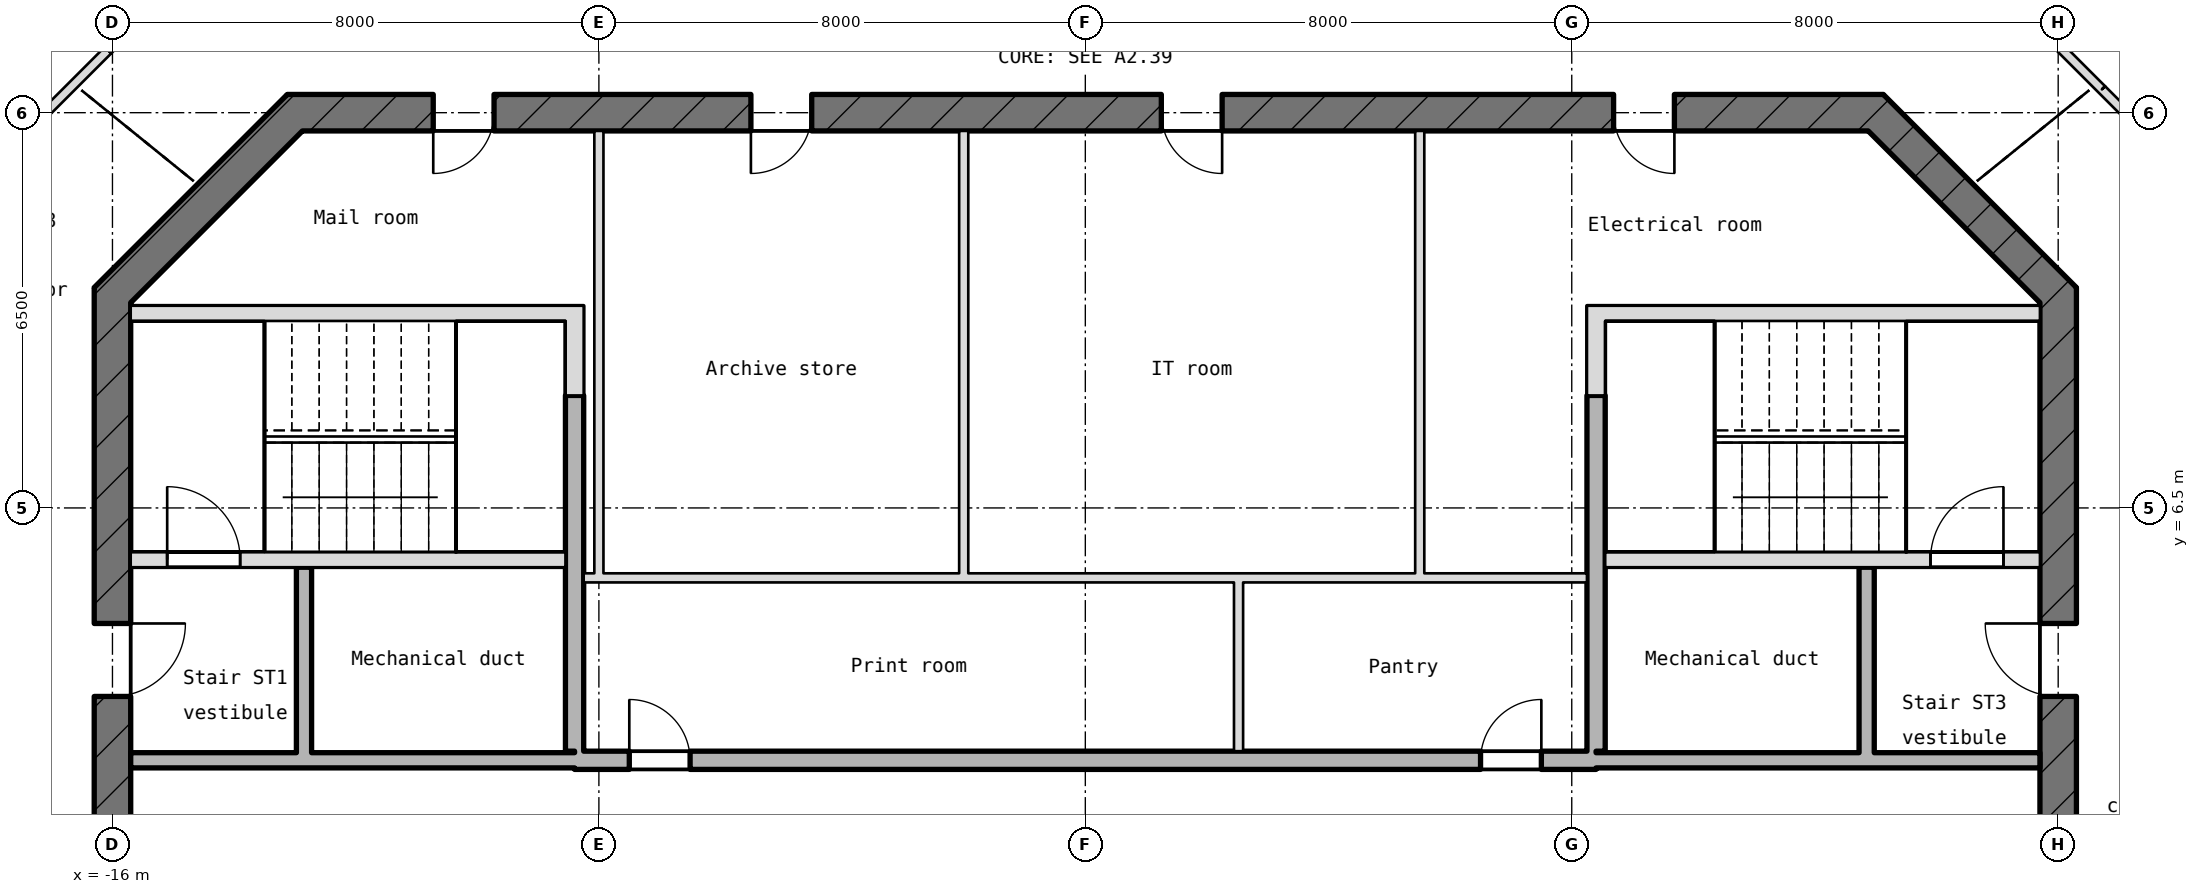
"""IFC4 building model, lengths in metres.
Left out: names, types, materials, properties, quantities, classifications, styles, units other than length and angle.
Written with IfcOpenShell. Run it as: python <this file> out.ifc"""

import sys

from ifc_helpers import new_model, si_unit, direction, frame, frame_2d, origin, place, context, subcontext, project, spatial, rectangle, extrude, element, fill, save


model = new_model("IFC4")
c1 = context("Model", 3, precision=1e-05, world=origin(), true_north=direction((0.0, 1.0)))
c2 = subcontext(c1, "Body", "Model", "MODEL_VIEW")
j1 = project(units=[si_unit("LENGTHUNIT", "METRE"), si_unit("PLANEANGLEUNIT", "RADIAN")], contexts=[c1])
p1 = place(None, origin())
s1 = spatial("IfcSite", under=j1, at=p1, CompositionType="ELEMENT")
p2 = place(p1, origin())
s2 = spatial("IfcBuilding", under=s1, at=p2, CompositionType="ELEMENT")
p3 = place(p2, frame((0.0, 0.0, 413.55)))
s3 = spatial("IfcBuildingStorey", under=s2, at=p3, CompositionType="ELEMENT", Elevation=413.55)
p4 = place(p3, frame((16.0, -10.124, -0.2), z_axis=(0.0, 0.0, 1.0), x_axis=(0.0, 1.0, 0.0)))
e1 = element("IfcWall", 1, at=p4, inside=s3, PredefinedType="SHEAR", context=c2, shape_type="SweptSolid", body=[
    extrude(rectangle(XDim=20.249, YDim=0.6, at=frame_2d((10.124, 0.0))), origin(), (0.0, 0.0, 1.0), 5.0),
])
p5 = place(p4, frame((8.924, 0.0, 0.2)))
e2 = element("IfcOpeningElement", 2, at=p5, cuts=e1, PredefinedType="OPENING", context=c2, shape_type="SweptSolid", body=[
    extrude(rectangle(XDim=2.4, YDim=2.1, at=frame_2d((1.2, 1.05))), frame((0.0, 0.31, 0.0), z_axis=(0.0, -1.0, 0.0), x_axis=(1.0, 0.0, 0.0)), (0.0, 0.0, 1.0), 0.62),
])
p6 = place(p4, frame((13.524, 0.0, 0.2)))
e3 = element("IfcOpeningElement", 3, at=p6, cuts=e1, PredefinedType="OPENING", context=c2, shape_type="SweptSolid", body=[
    extrude(rectangle(XDim=1.2, YDim=2.1, at=frame_2d((0.6, 1.05))), frame((0.0, 0.31, 0.0), z_axis=(0.0, -1.0, 0.0), x_axis=(1.0, 0.0, 0.0)), (0.0, 0.0, 1.0), 0.62),
])
p7 = place(p3, frame((16.088, 9.912, -0.2), z_axis=(0.0, 0.0, 1.0), x_axis=(-0.707106781187, 0.707106781187, 0.0)))
e4 = element("IfcWall", 4, at=p7, inside=s3, PredefinedType="SHEAR", context=c2, shape_type="SweptSolid", body=[
    extrude(rectangle(XDim=4.491, YDim=0.6, at=frame_2d((2.246, 0.0))), origin(), (0.0, 0.0, 1.0), 5.0),
])
p8 = place(p3, frame((13.124, 13.0, -0.2), z_axis=(0.0, 0.0, 1.0), x_axis=(-1.0, 0.0, 0.0)))
e5 = element("IfcWall", 5, at=p8, inside=s3, PredefinedType="SHEAR", context=c2, shape_type="SweptSolid", body=[
    extrude(rectangle(XDim=26.249, YDim=0.6, at=frame_2d((13.124, 0.0))), origin(), (0.0, 0.0, 1.0), 5.0),
])
p9 = place(p8, frame((22.849, 0.0, 0.2)))
e6 = element("IfcOpeningElement", 6, at=p9, cuts=e5, PredefinedType="OPENING", context=c2, shape_type="SweptSolid", body=[
    extrude(rectangle(XDim=1.0, YDim=2.1, at=frame_2d((0.5, 1.05))), frame((0.0, 0.31, 0.0), z_axis=(0.0, -1.0, 0.0), x_axis=(1.0, 0.0, 0.0)), (0.0, 0.0, 1.0), 0.62),
])
p10 = place(p8, frame((17.624, 0.0, 0.2)))
e7 = element("IfcOpeningElement", 7, at=p10, cuts=e5, PredefinedType="OPENING", context=c2, shape_type="SweptSolid", body=[
    extrude(rectangle(XDim=1.0, YDim=2.1, at=frame_2d((0.5, 1.05))), frame((0.0, 0.31, 0.0), z_axis=(0.0, -1.0, 0.0), x_axis=(1.0, 0.0, 0.0)), (0.0, 0.0, 1.0), 0.62),
])
p11 = place(p8, frame((10.874, 0.0, 0.2)))
e8 = element("IfcOpeningElement", 8, at=p11, cuts=e5, PredefinedType="OPENING", context=c2, shape_type="SweptSolid", body=[
    extrude(rectangle(XDim=1.0, YDim=2.1, at=frame_2d((0.5, 1.05))), frame((0.0, 0.31, 0.0), z_axis=(0.0, -1.0, 0.0), x_axis=(1.0, 0.0, 0.0)), (0.0, 0.0, 1.0), 0.62),
])
p12 = place(p8, frame((3.436, 0.0, 0.2)))
e9 = element("IfcOpeningElement", 9, at=p12, cuts=e5, PredefinedType="OPENING", context=c2, shape_type="SweptSolid", body=[
    extrude(rectangle(XDim=1.0, YDim=2.1, at=frame_2d((0.5, 1.05))), frame((0.0, 0.31, 0.0), z_axis=(0.0, -1.0, 0.0), x_axis=(1.0, 0.0, 0.0)), (0.0, 0.0, 1.0), 0.62),
])
p13 = place(p3, frame((-12.912, 13.088, -0.2), z_axis=(0.0, 0.0, 1.0), x_axis=(-0.707106781187, -0.707106781187, 0.0)))
e10 = element("IfcWall", 10, at=p13, inside=s3, PredefinedType="SHEAR", context=c2, shape_type="SweptSolid", body=[
    extrude(rectangle(XDim=4.491, YDim=0.6, at=frame_2d((2.246, 0.0))), origin(), (0.0, 0.0, 1.0), 5.0),
])
p14 = place(p3, frame((-16.0, 10.124, -0.2), z_axis=(0.0, 0.0, 1.0), x_axis=(0.0, -1.0, 0.0)))
e11 = element("IfcWall", 11, at=p14, inside=s3, PredefinedType="SHEAR", context=c2, shape_type="SweptSolid", body=[
    extrude(rectangle(XDim=20.249, YDim=0.6, at=frame_2d((10.124, 0.0))), origin(), (0.0, 0.0, 1.0), 5.0),
])
p15 = place(p14, frame((8.924, 0.0, 0.2)))
e12 = element("IfcOpeningElement", 12, at=p15, cuts=e11, PredefinedType="OPENING", context=c2, shape_type="SweptSolid", body=[
    extrude(rectangle(XDim=2.4, YDim=2.1, at=frame_2d((1.2, 1.05))), frame((0.0, 0.31, 0.0), z_axis=(0.0, -1.0, 0.0), x_axis=(1.0, 0.0, 0.0)), (0.0, 0.0, 1.0), 0.62),
])
p16 = place(p14, frame((5.524, 0.0, 0.2)))
e13 = element("IfcOpeningElement", 13, at=p16, cuts=e11, PredefinedType="OPENING", context=c2, shape_type="SweptSolid", body=[
    extrude(rectangle(XDim=1.2, YDim=2.1, at=frame_2d((0.6, 1.05))), frame((0.0, 0.31, 0.0), z_axis=(0.0, -1.0, 0.0), x_axis=(1.0, 0.0, 0.0)), (0.0, 0.0, 1.0), 0.62),
])
p17 = place(p3, frame((-15.7, 2.35, 0.0), z_axis=(0.0, 0.0, 1.0), x_axis=(1.0, 0.0, 0.0)))
e14 = element("IfcWall", 14, at=p17, inside=s3, PredefinedType="STANDARD", context=c2, shape_type="SweptSolid", body=[
    extrude(rectangle(XDim=7.3, YDim=0.25, at=frame_2d((3.65, 0.0))), origin(), (0.0, 0.0, 1.0), 4.8),
])
p18 = place(p3, frame((-8.4, 2.35, -0.2), z_axis=(0.0, 0.0, 1.0), x_axis=(1.0, 0.0, 0.0)))
e15 = element("IfcWall", 15, at=p18, inside=s3, PredefinedType="SHEAR", context=c2, shape_type="SweptSolid", body=[
    extrude(rectangle(XDim=16.8, YDim=0.3, at=frame_2d((8.4, 0.0))), origin(), (0.0, 0.0, 1.0), 5.0),
])
p19 = place(p18, frame((0.9, 0.0, 0.2)))
e16 = element("IfcOpeningElement", 16, at=p19, cuts=e15, PredefinedType="OPENING", context=c2, shape_type="SweptSolid", body=[
    extrude(rectangle(XDim=1.0, YDim=2.1, at=frame_2d((0.5, 1.05))), frame((0.0, 0.16, 0.0), z_axis=(0.0, -1.0, 0.0), x_axis=(1.0, 0.0, 0.0)), (0.0, 0.0, 1.0), 0.32),
])
p20 = place(p18, frame((14.9, 0.0, 0.2)))
e17 = element("IfcOpeningElement", 17, at=p20, cuts=e15, PredefinedType="OPENING", context=c2, shape_type="SweptSolid", body=[
    extrude(rectangle(XDim=1.0, YDim=2.1, at=frame_2d((0.5, 1.05))), frame((0.0, 0.16, 0.0), z_axis=(0.0, -1.0, 0.0), x_axis=(1.0, 0.0, 0.0)), (0.0, 0.0, 1.0), 0.32),
])
p21 = place(p3, frame((8.4, 2.35, 0.0), z_axis=(0.0, 0.0, 1.0), x_axis=(1.0, 0.0, 0.0)))
e18 = element("IfcWall", 18, at=p21, inside=s3, PredefinedType="STANDARD", context=c2, shape_type="SweptSolid", body=[
    extrude(rectangle(XDim=7.3, YDim=0.25, at=frame_2d((3.65, 0.0))), origin(), (0.0, 0.0, 1.0), 4.8),
])
p22 = place(p3, frame((-8.25, 5.35, 0.0), z_axis=(0.0, 0.0, 1.0), x_axis=(1.0, 0.0, 0.0)))
e19 = element("IfcWall", 19, at=p22, inside=s3, PredefinedType="PARTITIONING", context=c2, shape_type="SweptSolid", body=[
    extrude(rectangle(XDim=16.5, YDim=0.15, at=frame_2d((8.25, 0.0))), origin(), (0.0, 0.0, 1.0), 4.8),
])
p23 = place(p3, frame((-15.7, 5.65, -0.2), z_axis=(0.0, 0.0, 1.0), x_axis=(1.0, 0.0, 0.0)))
e20 = element("IfcWall", 20, at=p23, inside=s3, PredefinedType="SHEAR", context=c2, shape_type="SweptSolid", body=[
    extrude(rectangle(XDim=7.15, YDim=0.25, at=frame_2d((3.575, 0.0))), origin(), (0.0, 0.0, 1.0), 5.0),
])
p24 = place(p23, frame((0.6, 0.0, 0.2)))
e21 = element("IfcOpeningElement", 21, at=p24, cuts=e20, PredefinedType="OPENING", context=c2, shape_type="SweptSolid", body=[
    extrude(rectangle(XDim=1.2, YDim=2.1, at=frame_2d((0.6, 1.05))), frame((0.0, 0.135, 0.0), z_axis=(0.0, -1.0, 0.0), x_axis=(1.0, 0.0, 0.0)), (0.0, 0.0, 1.0), 0.27),
])
p25 = place(p3, frame((8.55, 5.65, -0.2), z_axis=(0.0, 0.0, 1.0), x_axis=(1.0, 0.0, 0.0)))
e22 = element("IfcWall", 22, at=p25, inside=s3, PredefinedType="SHEAR", context=c2, shape_type="SweptSolid", body=[
    extrude(rectangle(XDim=7.15, YDim=0.25, at=frame_2d((3.575, 0.0))), origin(), (0.0, 0.0, 1.0), 5.0),
])
p26 = place(p25, frame((5.35, 0.0, 0.2)))
e23 = element("IfcOpeningElement", 23, at=p26, cuts=e22, PredefinedType="OPENING", context=c2, shape_type="SweptSolid", body=[
    extrude(rectangle(XDim=1.2, YDim=2.1, at=frame_2d((0.6, 1.05))), frame((0.0, 0.135, 0.0), z_axis=(0.0, -1.0, 0.0), x_axis=(1.0, 0.0, 0.0)), (0.0, 0.0, 1.0), 0.27),
])
for number, where, z_axis, x_axis in (
    (24, (-15.7, 9.7, -0.2), (0.0, 0.0, 1.0), (1.0, 0.0, 0.0)),
    (25, (8.55, 9.7, -0.2), (0.0, 0.0, 1.0), (1.0, 0.0, 0.0)),
):
    element("IfcWall", number, at=place(p3, frame(where, z_axis=z_axis, x_axis=x_axis)), inside=s3, PredefinedType="SHEAR", context=c2, shape_type="SweptSolid", body=[
        extrude(rectangle(XDim=7.15, YDim=0.25, at=frame_2d((3.575, 0.0))), origin(), (0.0, 0.0, 1.0), 5.0),
    ])
p27 = place(p3, frame((-12.85, 2.475, 0.0), z_axis=(0.0, 0.0, 1.0), x_axis=(0.0, 1.0, 0.0)))
e26 = element("IfcWall", 26, at=p27, inside=s3, PredefinedType="STANDARD", context=c2, shape_type="SweptSolid", body=[
    extrude(rectangle(XDim=3.05, YDim=0.25, at=frame_2d((1.525, 0.0))), origin(), (0.0, 0.0, 1.0), 4.8),
])
p28 = place(p3, frame((-8.4, 2.5, -0.2), z_axis=(0.0, 0.0, 1.0), x_axis=(0.0, 1.0, 0.0)))
e27 = element("IfcWall", 27, at=p28, inside=s3, PredefinedType="SHEAR", context=c2, shape_type="SweptSolid", body=[
    extrude(rectangle(XDim=5.85, YDim=0.3, at=frame_2d((2.925, 0.0))), origin(), (0.0, 0.0, 1.0), 5.0),
])
p29 = place(p3, frame((-8.4, 8.35, -0.2), z_axis=(0.0, 0.0, 1.0), x_axis=(0.0, 1.0, 0.0)))
e28 = element("IfcWall", 28, at=p29, inside=s3, PredefinedType="SHEAR", context=c2, shape_type="SweptSolid", body=[
    extrude(rectangle(XDim=1.475, YDim=0.3, at=frame_2d((0.737, 0.0))), origin(), (0.0, 0.0, 1.0), 5.0),
])
for number, where, z_axis, x_axis in (
    (29, (-8.0, 5.425, 0.0), (0.0, 0.0, 1.0), (0.0, 1.0, 0.0)),
    (30, (-2.0, 5.425, 0.0), (0.0, 0.0, 1.0), (0.0, 1.0, 0.0)),
):
    element("IfcWall", number, at=place(p3, frame(where, z_axis=z_axis, x_axis=x_axis)), inside=s3, PredefinedType="PARTITIONING", context=c2, shape_type="SweptSolid", body=[
        extrude(rectangle(XDim=7.275, YDim=0.15, at=frame_2d((3.637, 0.0))), origin(), (0.0, 0.0, 1.0), 4.8),
    ])
p30 = place(p3, frame((2.52, 2.5, 0.0), z_axis=(0.0, 0.0, 1.0), x_axis=(0.0, 1.0, 0.0)))
e31 = element("IfcWall", 31, at=p30, inside=s3, PredefinedType="PARTITIONING", context=c2, shape_type="SweptSolid", body=[
    extrude(rectangle(XDim=2.775, YDim=0.15, at=frame_2d((1.387, 0.0))), origin(), (0.0, 0.0, 1.0), 4.8),
])
p31 = place(p3, frame((5.5, 5.425, 0.0), z_axis=(0.0, 0.0, 1.0), x_axis=(0.0, 1.0, 0.0)))
e32 = element("IfcWall", 32, at=p31, inside=s3, PredefinedType="PARTITIONING", context=c2, shape_type="SweptSolid", body=[
    extrude(rectangle(XDim=7.275, YDim=0.15, at=frame_2d((3.637, 0.0))), origin(), (0.0, 0.0, 1.0), 4.8),
])
p32 = place(p3, frame((8.4, 2.5, -0.2), z_axis=(0.0, 0.0, 1.0), x_axis=(0.0, 1.0, 0.0)))
e33 = element("IfcWall", 33, at=p32, inside=s3, PredefinedType="SHEAR", context=c2, shape_type="SweptSolid", body=[
    extrude(rectangle(XDim=5.85, YDim=0.3, at=frame_2d((2.925, 0.0))), origin(), (0.0, 0.0, 1.0), 5.0),
])
p33 = place(p3, frame((8.4, 8.35, -0.2), z_axis=(0.0, 0.0, 1.0), x_axis=(0.0, 1.0, 0.0)))
e34 = element("IfcWall", 34, at=p33, inside=s3, PredefinedType="SHEAR", context=c2, shape_type="SweptSolid", body=[
    extrude(rectangle(XDim=1.475, YDim=0.3, at=frame_2d((0.737, 0.0))), origin(), (0.0, 0.0, 1.0), 5.0),
])
p34 = place(p3, frame((12.85, 2.475, 0.0), z_axis=(0.0, 0.0, 1.0), x_axis=(0.0, 1.0, 0.0)))
e35 = element("IfcWall", 35, at=p34, inside=s3, PredefinedType="STANDARD", context=c2, shape_type="SweptSolid", body=[
    extrude(rectangle(XDim=3.05, YDim=0.25, at=frame_2d((1.525, 0.0))), origin(), (0.0, 0.0, 1.0), 4.8),
])
p35 = place(p3, frame((-18.9, 11.201, 0.0), z_axis=(0.0, 0.0, 1.0), x_axis=(0.707106781187, 0.707106781187, 0.0)))
e36 = element("IfcWall", 36, at=p35, inside=s3, PredefinedType="PARTITIONING", context=c2, shape_type="SweptSolid", body=[
    extrude(rectangle(XDim=3.999, YDim=0.15, at=frame_2d((2.0, 0.0))), origin(), (0.0, 0.0, 1.0), 4.8),
])
p36 = place(p3, frame((-16.072, 14.029, 0.0), z_axis=(0.0, 0.0, 1.0), x_axis=(0.707060644966, 0.707152914397, 0.0)))
e37 = element("IfcWall", 37, at=p36, inside=s3, PredefinedType="PARTITIONING", context=c2, shape_type="SweptSolid", body=[
    extrude(rectangle(XDim=2.646, YDim=0.15, at=frame_2d((1.323, 0.0))), origin(), (0.0, 0.0, 1.0), 4.338),
])
p37 = place(p3, frame((18.412, 11.689, 0.0), z_axis=(0.0, 0.0, 1.0), x_axis=(-0.707055831388, 0.707157727314, 0.0)))
e38 = element("IfcWall", 38, at=p37, inside=s3, PredefinedType="PARTITIONING", context=c2, shape_type="SweptSolid", body=[
    extrude(rectangle(XDim=2.396, YDim=0.15, at=frame_2d((1.198, 0.0))), origin(), (0.0, 0.0, 1.0), 4.338),
])
p38 = place(p3, frame((16.718, 13.383, 0.0), z_axis=(0.0, 0.0, 1.0), x_axis=(-0.70703818665, 0.707175369069, 0.0)))
e39 = element("IfcWall", 39, at=p38, inside=s3, PredefinedType="PARTITIONING", context=c2, shape_type="SweptSolid", body=[
    extrude(rectangle(XDim=3.559, YDim=0.15, at=frame_2d((1.78, 0.0))), origin(), (0.0, 0.0, 1.0), 4.8),
])
p39 = place(p24, origin())
e40 = element("IfcDoor", 40, at=p39, inside=s3, OperationType="SINGLE_SWING_RIGHT", PredefinedType="DOOR", context=c2, shape_type="SweptSolid", body=[
    extrude(rectangle(XDim=1.2, YDim=2.1, at=frame_2d((0.6, 1.05))), frame((0.0, 0.025, 0.0), z_axis=(0.0, -1.0, 0.0), x_axis=(1.0, 0.0, 0.0)), (0.0, 0.0, 1.0), 0.05),
])
fill(e21, e40)
p40 = place(p26, origin())
e41 = element("IfcDoor", 41, at=p40, inside=s3, OperationType="SINGLE_SWING_RIGHT", PredefinedType="DOOR", context=c2, shape_type="SweptSolid", body=[
    extrude(rectangle(XDim=1.2, YDim=2.1, at=frame_2d((0.6, 1.05))), frame((0.0, 0.025, 0.0), z_axis=(0.0, -1.0, 0.0), x_axis=(1.0, 0.0, 0.0)), (0.0, 0.0, 1.0), 0.05),
])
fill(e23, e41)
p41 = place(p16, origin())
e42 = element("IfcDoor", 42, at=p41, inside=s3, OperationType="SINGLE_SWING_RIGHT", PredefinedType="DOOR", context=c2, shape_type="SweptSolid", body=[
    extrude(rectangle(XDim=1.2, YDim=2.1, at=frame_2d((0.6, 1.05))), frame((0.0, 0.025, 0.0), z_axis=(0.0, -1.0, 0.0), x_axis=(1.0, 0.0, 0.0)), (0.0, 0.0, 1.0), 0.05),
])
fill(e13, e42)
p42 = place(p6, origin())
e43 = element("IfcDoor", 43, at=p42, inside=s3, OperationType="SINGLE_SWING_RIGHT", PredefinedType="DOOR", context=c2, shape_type="SweptSolid", body=[
    extrude(rectangle(XDim=1.2, YDim=2.1, at=frame_2d((0.6, 1.05))), frame((0.0, 0.025, 0.0), z_axis=(0.0, -1.0, 0.0), x_axis=(1.0, 0.0, 0.0)), (0.0, 0.0, 1.0), 0.05),
])
fill(e3, e43)
p43 = place(p19, origin())
e44 = element("IfcDoor", 44, at=p43, inside=s3, OperationType="SINGLE_SWING_RIGHT", PredefinedType="DOOR", context=c2, shape_type="SweptSolid", body=[
    extrude(rectangle(XDim=1.0, YDim=2.1, at=frame_2d((0.5, 1.05))), frame((0.0, 0.025, 0.0), z_axis=(0.0, -1.0, 0.0), x_axis=(1.0, 0.0, 0.0)), (0.0, 0.0, 1.0), 0.05),
])
fill(e16, e44)
p44 = place(p20, origin())
e45 = element("IfcDoor", 45, at=p44, inside=s3, OperationType="SINGLE_SWING_RIGHT", PredefinedType="DOOR", context=c2, shape_type="SweptSolid", body=[
    extrude(rectangle(XDim=1.0, YDim=2.1, at=frame_2d((0.5, 1.05))), frame((0.0, 0.025, 0.0), z_axis=(0.0, -1.0, 0.0), x_axis=(1.0, 0.0, 0.0)), (0.0, 0.0, 1.0), 0.05),
])
fill(e17, e45)
p45 = place(p9, origin())
e46 = element("IfcDoor", 46, at=p45, inside=s3, OperationType="SINGLE_SWING_RIGHT", PredefinedType="DOOR", context=c2, shape_type="SweptSolid", body=[
    extrude(rectangle(XDim=1.0, YDim=2.1, at=frame_2d((0.5, 1.05))), frame((0.0, 0.025, 0.0), z_axis=(0.0, -1.0, 0.0), x_axis=(1.0, 0.0, 0.0)), (0.0, 0.0, 1.0), 0.05),
])
fill(e6, e46)
p46 = place(p10, origin())
e47 = element("IfcDoor", 47, at=p46, inside=s3, OperationType="SINGLE_SWING_RIGHT", PredefinedType="DOOR", context=c2, shape_type="SweptSolid", body=[
    extrude(rectangle(XDim=1.0, YDim=2.1, at=frame_2d((0.5, 1.05))), frame((0.0, 0.025, 0.0), z_axis=(0.0, -1.0, 0.0), x_axis=(1.0, 0.0, 0.0)), (0.0, 0.0, 1.0), 0.05),
])
fill(e7, e47)
p47 = place(p11, origin())
e48 = element("IfcDoor", 48, at=p47, inside=s3, OperationType="SINGLE_SWING_RIGHT", PredefinedType="DOOR", context=c2, shape_type="SweptSolid", body=[
    extrude(rectangle(XDim=1.0, YDim=2.1, at=frame_2d((0.5, 1.05))), frame((0.0, 0.025, 0.0), z_axis=(0.0, -1.0, 0.0), x_axis=(1.0, 0.0, 0.0)), (0.0, 0.0, 1.0), 0.05),
])
fill(e8, e48)
p48 = place(p12, origin())
e49 = element("IfcDoor", 49, at=p48, inside=s3, OperationType="SINGLE_SWING_RIGHT", PredefinedType="DOOR", context=c2, shape_type="SweptSolid", body=[
    extrude(rectangle(XDim=1.0, YDim=2.1, at=frame_2d((0.5, 1.05))), frame((0.0, 0.025, 0.0), z_axis=(0.0, -1.0, 0.0), x_axis=(1.0, 0.0, 0.0)), (0.0, 0.0, 1.0), 0.05),
])
fill(e9, e49)
save(model, sys.argv[1])
